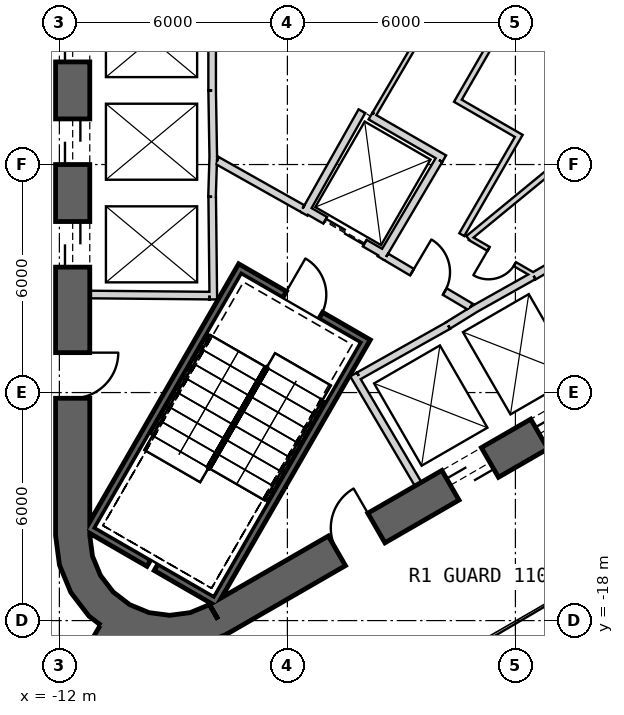
"""IFC4 building model, lengths in metres.
Left out: names, types, materials, properties, quantities, classifications, styles, units other than length and angle.
Written with IfcOpenShell. Run it as: python <this file> out.ifc"""

import sys

from ifc_helpers import new_model, si_unit, direction, frame, frame_2d, origin, place, context, subcontext, project, spatial, polyline, rectangle, outline, extrude, element, fill, save


model = new_model("IFC4")
c1 = context("Model", 3, precision=1e-05, world=origin(), true_north=direction((0.0, 1.0)))
c2 = subcontext(c1, "Body", "Model", "MODEL_VIEW")
j1 = project(units=[si_unit("LENGTHUNIT", "METRE"), si_unit("PLANEANGLEUNIT", "RADIAN")], contexts=[c1])
p1 = place(None, origin())
s1 = spatial("IfcSite", under=j1, at=p1, CompositionType="ELEMENT")
p2 = place(p1, origin())
s2 = spatial("IfcBuilding", under=s1, at=p2, CompositionType="ELEMENT")
p3 = place(p2, frame((0.0, 0.0, 33.5)))
s3 = spatial("IfcBuildingStorey", under=s2, at=p3, CompositionType="ELEMENT", Elevation=33.5)
p4 = place(p3, frame((-11.65, 15.762, 0.0), z_axis=(0.0, 0.0, 1.0), x_axis=(0.0, -1.0, 0.0)))
e1 = element("IfcWall", 1, at=p4, inside=s3, PredefinedType="SHEAR", context=c2, shape_type="SweptSolid", body=[
    extrude(rectangle(XDim=31.523, YDim=0.9, at=frame_2d((15.762, 0.0))), origin(), (0.0, 0.0, 1.0), 6.0),
])
p5 = place(p4, frame((7.062, 0.0, 0.0)))
e2 = element("IfcOpeningElement", 2, at=p5, cuts=e1, PredefinedType="OPENING", context=c2, shape_type="SweptSolid", body=[
    extrude(rectangle(XDim=1.2, YDim=2.4, at=frame_2d((0.6, 1.2))), frame((0.0, 0.46, 0.0), z_axis=(0.0, -1.0, 0.0), x_axis=(1.0, 0.0, 0.0)), (0.0, 0.0, 1.0), 0.92),
])
p6 = place(p4, frame((9.762, 0.0, 0.0)))
e3 = element("IfcOpeningElement", 3, at=p6, cuts=e1, PredefinedType="OPENING", context=c2, shape_type="SweptSolid", body=[
    extrude(rectangle(XDim=1.2, YDim=2.4, at=frame_2d((0.6, 1.2))), frame((0.0, 0.46, 0.0), z_axis=(0.0, -1.0, 0.0), x_axis=(1.0, 0.0, 0.0)), (0.0, 0.0, 1.0), 0.92),
])
p7 = place(p4, frame((12.462, 0.0, 0.0)))
e4 = element("IfcOpeningElement", 4, at=p7, cuts=e1, PredefinedType="OPENING", context=c2, shape_type="SweptSolid", body=[
    extrude(rectangle(XDim=1.2, YDim=2.4, at=frame_2d((0.6, 1.2))), frame((0.0, 0.46, 0.0), z_axis=(0.0, -1.0, 0.0), x_axis=(1.0, 0.0, 0.0)), (0.0, 0.0, 1.0), 0.92),
])
p8 = place(p4, frame((15.162, 0.0, 0.0)))
e5 = element("IfcOpeningElement", 5, at=p8, cuts=e1, PredefinedType="OPENING", context=c2, shape_type="SweptSolid", body=[
    extrude(rectangle(XDim=1.2, YDim=2.4, at=frame_2d((0.6, 1.2))), frame((0.0, 0.46, 0.0), z_axis=(0.0, -1.0, 0.0), x_axis=(1.0, 0.0, 0.0)), (0.0, 0.0, 1.0), 0.92),
])
p9 = place(p4, frame((17.862, 0.0, 0.0)))
e6 = element("IfcOpeningElement", 6, at=p9, cuts=e1, PredefinedType="OPENING", context=c2, shape_type="SweptSolid", body=[
    extrude(rectangle(XDim=1.2, YDim=2.4, at=frame_2d((0.6, 1.2))), frame((0.0, 0.46, 0.0), z_axis=(0.0, -1.0, 0.0), x_axis=(1.0, 0.0, 0.0)), (0.0, 0.0, 1.0), 0.92),
])
p10 = place(p4, frame((20.562, 0.0, 0.0)))
e7 = element("IfcOpeningElement", 7, at=p10, cuts=e1, PredefinedType="OPENING", context=c2, shape_type="SweptSolid", body=[
    extrude(rectangle(XDim=1.2, YDim=2.4, at=frame_2d((0.6, 1.2))), frame((0.0, 0.46, 0.0), z_axis=(0.0, -1.0, 0.0), x_axis=(1.0, 0.0, 0.0)), (0.0, 0.0, 1.0), 0.92),
])
p11 = place(p4, frame((23.262, 0.0, 0.0)))
e8 = element("IfcOpeningElement", 8, at=p11, cuts=e1, PredefinedType="OPENING", context=c2, shape_type="SweptSolid", body=[
    extrude(rectangle(XDim=1.2, YDim=2.4, at=frame_2d((0.6, 1.2))), frame((0.0, 0.46, 0.0), z_axis=(0.0, -1.0, 0.0), x_axis=(1.0, 0.0, 0.0)), (0.0, 0.0, 1.0), 0.92),
])
p12 = place(p4, frame((3.612, 0.0, 0.0)))
e9 = element("IfcOpeningElement", 9, at=p12, cuts=e1, PredefinedType="OPENING", context=c2, shape_type="SweptSolid", body=[
    extrude(rectangle(XDim=1.2, YDim=2.4, at=frame_2d((0.6, 1.2))), frame((0.0, 0.46, 0.0), z_axis=(0.0, -1.0, 0.0), x_axis=(1.0, 0.0, 0.0)), (0.0, 0.0, 1.0), 0.92),
])
p13 = place(p4, frame((26.712, 0.0, 0.0)))
e10 = element("IfcOpeningElement", 10, at=p13, cuts=e1, PredefinedType="OPENING", context=c2, shape_type="SweptSolid", body=[
    extrude(rectangle(XDim=1.2, YDim=2.4, at=frame_2d((0.6, 1.2))), frame((0.0, 0.46, 0.0), z_axis=(0.0, -1.0, 0.0), x_axis=(1.0, 0.0, 0.0)), (0.0, 0.0, 1.0), 0.92),
])
p14 = place(p3, frame((-7.825, -17.97, 0.0), z_axis=(0.0, 0.0, 1.0), x_axis=(0.866028369851, 0.499994862586, 0.0)))
e11 = element("IfcWall", 11, at=p14, inside=s3, PredefinedType="SHEAR", context=c2, shape_type="SweptSolid", body=[
    extrude(rectangle(XDim=31.523, YDim=0.9, at=frame_2d((15.762, 0.0))), origin(), (0.0, 0.0, 1.0), 6.0),
])
p15 = place(p14, frame((7.062, 0.0, 0.0)))
e12 = element("IfcOpeningElement", 12, at=p15, cuts=e11, PredefinedType="OPENING", context=c2, shape_type="SweptSolid", body=[
    extrude(rectangle(XDim=1.2, YDim=2.4, at=frame_2d((0.6, 1.2))), frame((0.0, 0.46, 0.0), z_axis=(0.0, -1.0, 0.0), x_axis=(1.0, 0.0, 0.0)), (0.0, 0.0, 1.0), 0.92),
])
p16 = place(p14, frame((9.762, 0.0, 0.0)))
e13 = element("IfcOpeningElement", 13, at=p16, cuts=e11, PredefinedType="OPENING", context=c2, shape_type="SweptSolid", body=[
    extrude(rectangle(XDim=1.2, YDim=2.4, at=frame_2d((0.6, 1.2))), frame((0.0, 0.46, 0.0), z_axis=(0.0, -1.0, 0.0), x_axis=(1.0, 0.0, 0.0)), (0.0, 0.0, 1.0), 0.92),
])
p17 = place(p14, frame((12.462, 0.0, 0.0)))
e14 = element("IfcOpeningElement", 14, at=p17, cuts=e11, PredefinedType="OPENING", context=c2, shape_type="SweptSolid", body=[
    extrude(rectangle(XDim=1.2, YDim=2.4, at=frame_2d((0.6, 1.2))), frame((0.0, 0.46, 0.0), z_axis=(0.0, -1.0, 0.0), x_axis=(1.0, 0.0, 0.0)), (0.0, 0.0, 1.0), 0.92),
])
p18 = place(p14, frame((15.162, 0.0, 0.0)))
e15 = element("IfcOpeningElement", 15, at=p18, cuts=e11, PredefinedType="OPENING", context=c2, shape_type="SweptSolid", body=[
    extrude(rectangle(XDim=1.2, YDim=2.4, at=frame_2d((0.6, 1.2))), frame((0.0, 0.46, 0.0), z_axis=(0.0, -1.0, 0.0), x_axis=(1.0, 0.0, 0.0)), (0.0, 0.0, 1.0), 0.92),
])
p19 = place(p14, frame((17.862, 0.0, 0.0)))
e16 = element("IfcOpeningElement", 16, at=p19, cuts=e11, PredefinedType="OPENING", context=c2, shape_type="SweptSolid", body=[
    extrude(rectangle(XDim=1.2, YDim=2.4, at=frame_2d((0.6, 1.2))), frame((0.0, 0.46, 0.0), z_axis=(0.0, -1.0, 0.0), x_axis=(1.0, 0.0, 0.0)), (0.0, 0.0, 1.0), 0.92),
])
p20 = place(p14, frame((20.562, 0.0, 0.0)))
e17 = element("IfcOpeningElement", 17, at=p20, cuts=e11, PredefinedType="OPENING", context=c2, shape_type="SweptSolid", body=[
    extrude(rectangle(XDim=1.2, YDim=2.4, at=frame_2d((0.6, 1.2))), frame((0.0, 0.46, 0.0), z_axis=(0.0, -1.0, 0.0), x_axis=(1.0, 0.0, 0.0)), (0.0, 0.0, 1.0), 0.92),
])
p21 = place(p14, frame((26.712, 0.0, 0.0)))
e18 = element("IfcOpeningElement", 18, at=p21, cuts=e11, PredefinedType="OPENING", context=c2, shape_type="SweptSolid", body=[
    extrude(rectangle(XDim=1.2, YDim=2.4, at=frame_2d((0.6, 1.2))), frame((0.0, 0.46, 0.0), z_axis=(0.0, -1.0, 0.0), x_axis=(1.0, 0.0, 0.0)), (0.0, 0.0, 1.0), 0.92),
])
p22 = place(p14, frame((3.612, 0.0, 0.0)))
e19 = element("IfcOpeningElement", 19, at=p22, cuts=e11, PredefinedType="OPENING", context=c2, shape_type="SweptSolid", body=[
    extrude(rectangle(XDim=1.2, YDim=2.4, at=frame_2d((0.6, 1.2))), frame((0.0, 0.46, 0.0), z_axis=(0.0, -1.0, 0.0), x_axis=(1.0, 0.0, 0.0)), (0.0, 0.0, 1.0), 0.92),
])
p23 = place(p3, origin())
e20 = element("IfcWall", 20, at=p23, inside=s3, PredefinedType="SHEAR", context=c2, shape_type="SweptSolid", body=[
    extrude(outline(polyline([(-12.1, -15.762), (-11.998, -16.538), (-11.698, -17.262), (-11.221, -17.883), (-10.6, -18.36), (-9.876, -18.659), (-9.1, -18.762), (-8.323, -18.659), (-7.6, -18.36), (-8.05, -17.58), (-8.556, -17.79), (-9.1, -17.862), (-9.644, -17.79), (-10.15, -17.58), (-10.585, -17.247), (-10.919, -16.812), (-11.128, -16.305), (-11.2, -15.762), (-12.1, -15.762)])), origin(), (0.0, 0.0, 1.0), 6.0),
])
p24 = place(p3, frame((-10.575, -18.316, 0.0), z_axis=(0.0, 0.0, 1.0), x_axis=(-0.499996575515, -0.866027380903, 0.0)))
e21 = element("IfcWall", 21, at=p24, inside=s3, PredefinedType="SHEAR", context=c2, shape_type="SweptSolid", body=[
    extrude(rectangle(XDim=13.954, YDim=0.8, at=frame_2d((6.977, 0.0))), origin(), (0.0, 0.0, 1.0), 6.0),
])
p25 = place(p24, frame((2.05, 0.0, 0.0)))
e22 = element("IfcOpeningElement", 22, at=p25, cuts=e21, PredefinedType="OPENING", context=c2, shape_type="SweptSolid", body=[
    extrude(rectangle(XDim=1.4, YDim=2.4, at=frame_2d((0.7, 1.2))), frame((0.0, 0.41, 0.0), z_axis=(0.0, -1.0, 0.0), x_axis=(1.0, 0.0, 0.0)), (0.0, 0.0, 1.0), 0.82),
])
p26 = place(p3, frame((-7.98, 4.05, 0.0), z_axis=(0.0, 0.0, 1.0), x_axis=(0.0, -1.0, 0.0)))
e23 = element("IfcWall", 23, at=p26, inside=s3, PredefinedType="PLUMBINGWALL", context=c2, shape_type="SweptSolid", body=[
    extrude(rectangle(XDim=8.1, YDim=0.2, at=frame_2d((4.05, 0.0))), origin(), (0.0, 0.0, 1.0), 5.65),
])
p27 = place(p3, frame((-7.95, -5.772, 0.0), z_axis=(0.0, 0.0, 1.0), x_axis=(-0.030803413295, -0.999525462272, 0.0)))
e24 = element("IfcWall", 24, at=p27, inside=s3, PredefinedType="PLUMBINGWALL", context=c2, shape_type="SweptSolid", body=[
    extrude(rectangle(XDim=1.078, YDim=0.2, at=frame_2d((0.539, 0.0))), origin(), (0.0, 0.0, 1.0), 5.65),
])
p28 = place(p3, frame((-7.98, -4.05, 0.0), z_axis=(0.0, 0.0, 1.0), x_axis=(0.016809909365, -0.999858703491, 0.0)))
e25 = element("IfcWall", 25, at=p28, inside=s3, PredefinedType="PLUMBINGWALL", context=c2, shape_type="SweptSolid", body=[
    extrude(rectangle(XDim=1.844, YDim=0.2, at=frame_2d((0.922, 0.0))), origin(), (0.0, 0.0, 1.0), 5.65),
])
p29 = place(p3, frame((-7.979, -6.85, 0.0), z_axis=(0.0, 0.0, 1.0), x_axis=(0.011121475088, -0.999938154483, 0.0)))
e26 = element("IfcWall", 26, at=p29, inside=s3, PredefinedType="PLUMBINGWALL", context=c2, shape_type="SweptSolid", body=[
    extrude(rectangle(XDim=2.7, YDim=0.2, at=frame_2d((1.35, 0.0))), origin(), (0.0, 0.0, 1.0), 5.65),
])
p30 = place(p3, frame((-8.05, -9.449, 0.0), z_axis=(0.0, 0.0, 1.0), x_axis=(-0.999957467379, 0.009222983926, 0.0)))
e27 = element("IfcWall", 27, at=p30, inside=s3, PredefinedType="PLUMBINGWALL", context=c2, shape_type="SweptSolid", body=[
    extrude(rectangle(XDim=3.15, YDim=0.2, at=frame_2d((1.575, 0.0))), origin(), (0.0, 0.0, 1.0), 5.65),
])
p31 = place(p3, frame((0.483, -8.936, 0.0), z_axis=(0.0, 0.0, 1.0), x_axis=(0.866030989016, 0.499990325971, 0.0)))
e28 = element("IfcWall", 28, at=p31, inside=s3, PredefinedType="PLUMBINGWALL", context=c2, shape_type="SweptSolid", body=[
    extrude(rectangle(XDim=8.1, YDim=0.2, at=frame_2d((4.05, 0.0))), origin(), (0.0, 0.0, 1.0), 5.65),
])
p32 = place(p3, frame((-2.558, -14.409, 0.0), z_axis=(0.0, 0.0, 1.0), x_axis=(-0.507997497166, 0.861358544901, 0.0)))
e29 = element("IfcWall", 29, at=p32, inside=s3, PredefinedType="PLUMBINGWALL", context=c2, shape_type="SweptSolid", body=[
    extrude(rectangle(XDim=3.35, YDim=0.2, at=frame_2d((1.675, 0.0))), origin(), (0.0, 0.0, 1.0), 5.65),
])
p33 = place(p3, frame((-1.769, -10.237, 0.0), z_axis=(0.0, 0.0, 1.0), x_axis=(-0.871534483978, -0.490334215854, 0.0)))
e30 = element("IfcWall", 30, at=p33, inside=s3, PredefinedType="PLUMBINGWALL", context=c2, shape_type="SweptSolid", body=[
    extrude(rectangle(XDim=2.7, YDim=0.2, at=frame_2d((1.35, 0.0))), origin(), (0.0, 0.0, 1.0), 5.65),
])
p34 = place(p3, frame((-1.024, -9.771, 0.0), z_axis=(0.0, 0.0, 1.0), x_axis=(-0.850348075135, -0.526220629693, 0.0)))
e31 = element("IfcWall", 31, at=p34, inside=s3, PredefinedType="PLUMBINGWALL", context=c2, shape_type="SweptSolid", body=[
    extrude(rectangle(XDim=0.878, YDim=0.2, at=frame_2d((0.439, 0.0))), origin(), (0.0, 0.0, 1.0), 5.65),
])
p35 = place(p3, frame((-1.13, -9.832, 0.0), z_axis=(0.0, 0.0, 1.0), x_axis=(0.871988740738, 0.489525929882, 0.0)))
e32 = element("IfcWall", 32, at=p35, inside=s3, PredefinedType="PLUMBINGWALL", context=c2, shape_type="SweptSolid", body=[
    extrude(rectangle(XDim=1.845, YDim=0.2, at=frame_2d((0.922, 0.0))), origin(), (0.0, 0.0, 1.0), 5.65),
])
p36 = place(p3, frame((-3.905, -10.563, -0.3), z_axis=(0.0, 0.0, 1.0), x_axis=(-0.500012932018, -0.866017937352, 0.0)))
e33 = element("IfcWall", 33, at=p36, inside=s3, PredefinedType="SHEAR", context=c2, shape_type="SweptSolid", body=[
    extrude(rectangle(XDim=8.1, YDim=0.2, at=frame_2d((4.05, 0.0))), origin(), (0.0, 0.0, 1.0), 5.95),
])
p37 = place(p3, frame((-11.282, -15.541, -0.3), z_axis=(0.0, 0.0, 1.0), x_axis=(0.866000578957, -0.500042995397, 0.0)))
e34 = element("IfcWall", 34, at=p37, inside=s3, PredefinedType="SHEAR", context=c2, shape_type="SweptSolid", body=[
    extrude(rectangle(XDim=1.89, YDim=0.2, at=frame_2d((0.945, 0.0))), origin(), (0.0, 0.0, 1.0), 5.95),
])
p38 = place(p3, frame((-9.455, -16.596, -0.3), z_axis=(0.0, 0.0, 1.0), x_axis=(0.866038843867, -0.499976720371, 0.0)))
e35 = element("IfcWall", 35, at=p38, inside=s3, PredefinedType="SHEAR", context=c2, shape_type="SweptSolid", body=[
    extrude(rectangle(XDim=1.69, YDim=0.2, at=frame_2d((0.845, 0.0))), origin(), (0.0, 0.0, 1.0), 5.95),
])
p39 = place(p3, frame((-7.196, -8.663, -0.3), z_axis=(0.0, 0.0, 1.0), x_axis=(-0.499997992926, -0.866026562566, 0.0)))
e36 = element("IfcWall", 36, at=p39, inside=s3, PredefinedType="SHEAR", context=c2, shape_type="SweptSolid", body=[
    extrude(rectangle(XDim=7.9, YDim=0.2, at=frame_2d((3.95, 0.0))), origin(), (0.0, 0.0, 1.0), 5.95),
])
p40 = place(p3, frame((-4.041, -10.599, -0.3), z_axis=(0.0, 0.0, 1.0), x_axis=(-0.866047807691, 0.499961193289, 0.0)))
e37 = element("IfcWall", 37, at=p40, inside=s3, PredefinedType="SHEAR", context=c2, shape_type="SweptSolid", body=[
    extrude(rectangle(XDim=3.6, YDim=0.2, at=frame_2d((1.8, 0.0))), origin(), (0.0, 0.0, 1.0), 5.95),
])
p41 = place(p40, frame((1.25, 0.0, 0.3)))
e38 = element("IfcOpeningElement", 38, at=p41, cuts=e37, PredefinedType="OPENING", context=c2, shape_type="SweptSolid", body=[
    extrude(rectangle(XDim=1.1, YDim=2.1, at=frame_2d((0.55, 1.05))), frame((0.0, 0.11, 0.0), z_axis=(0.0, -1.0, 0.0), x_axis=(1.0, 0.0, 0.0)), (0.0, 0.0, 1.0), 0.22),
])
p42 = place(p3, frame((-3.446, -8.368, 0.0), z_axis=(0.0, 0.0, 1.0), x_axis=(-0.866024647952, 0.500001309137, 0.0)))
e39 = element("IfcWall", 39, at=p42, inside=s3, PredefinedType="PLUMBINGWALL", context=c2, shape_type="SweptSolid", body=[
    extrude(rectangle(XDim=2.4, YDim=0.2, at=frame_2d((1.2, 0.0))), origin(), (0.0, 0.0, 1.0), 5.65),
])
p43 = place(p42, frame((0.6, 0.0, 0.0)))
e40 = element("IfcOpeningElement", 40, at=p43, cuts=e39, PredefinedType="OPENING", context=c2, shape_type="SweptSolid", body=[
    extrude(rectangle(XDim=1.2, YDim=2.4, at=frame_2d((0.6, 1.2))), frame((0.0, 0.11, 0.0), z_axis=(0.0, -1.0, 0.0), x_axis=(1.0, 0.0, 0.0)), (0.0, 0.0, 1.0), 0.22),
])
p44 = place(p3, frame((-5.562, -7.296, 0.0), z_axis=(0.0, 0.0, 1.0), x_axis=(0.491322718731, 0.870977603649, 0.0)))
e41 = element("IfcWall", 41, at=p44, inside=s3, PredefinedType="PLUMBINGWALL", context=c2, shape_type="SweptSolid", body=[
    extrude(rectangle(XDim=3.1, YDim=0.2, at=frame_2d((1.55, 0.0))), origin(), (0.0, 0.0, 1.0), 5.65),
])
p45 = place(p3, frame((-3.814, -4.726, 0.0), z_axis=(0.0, 0.0, 1.0), x_axis=(0.866000409959, -0.500043288077, 0.0)))
e42 = element("IfcWall", 42, at=p45, inside=s3, PredefinedType="PLUMBINGWALL", context=c2, shape_type="SweptSolid", body=[
    extrude(rectangle(XDim=2.24, YDim=0.2, at=frame_2d((1.12, 0.0))), origin(), (0.0, 0.0, 1.0), 5.65),
])
p46 = place(p3, frame((-2.012, -5.882, 0.0), z_axis=(0.0, 0.0, 1.0), x_axis=(-0.508619639323, -0.860991325447, 0.0)))
e43 = element("IfcWall", 43, at=p46, inside=s3, PredefinedType="PLUMBINGWALL", context=c2, shape_type="SweptSolid", body=[
    extrude(rectangle(XDim=3.0, YDim=0.2, at=frame_2d((1.5, 0.0))), origin(), (0.0, 0.0, 1.0), 5.65),
])
p47 = place(p3, frame((-7.849, -5.894, 0.0), z_axis=(0.0, 0.0, 1.0), x_axis=(0.871340486379, -0.490678873396, 0.0)))
e44 = element("IfcWall", 44, at=p47, inside=s3, PredefinedType="PARTITIONING", context=c2, shape_type="SweptSolid", body=[
    extrude(rectangle(XDim=2.581, YDim=0.2, at=frame_2d((1.291, 0.0))), origin(), (0.0, 0.0, 1.0), 5.65),
])
p48 = place(p3, frame((-3.401, -8.43, 0.0), z_axis=(0.0, 0.0, 1.0), x_axis=(0.860598681535, -0.509283721849, 0.0)))
e45 = element("IfcWall", 45, at=p48, inside=s3, PredefinedType="PARTITIONING", context=c2, shape_type="SweptSolid", body=[
    extrude(rectangle(XDim=2.581, YDim=0.2, at=frame_2d((1.291, 0.0))), origin(), (0.0, 0.0, 1.0), 5.65),
])
p49 = place(p48, frame((0.791, 0.0, 0.0)))
e46 = element("IfcOpeningElement", 46, at=p49, cuts=e45, PredefinedType="OPENING", context=c2, shape_type="SweptSolid", body=[
    extrude(rectangle(XDim=1.0, YDim=2.1, at=frame_2d((0.5, 1.05))), frame((0.0, 0.11, 0.0), z_axis=(0.0, -1.0, 0.0), x_axis=(1.0, 0.0, 0.0)), (0.0, 0.0, 1.0), 0.22),
])
p50 = place(p3, frame((-3.711, -4.67, 0.0), z_axis=(0.0, 0.0, 1.0), x_axis=(0.505649867547, 0.862738785178, 0.0)))
e47 = element("IfcWall", 47, at=p50, inside=s3, PredefinedType="PARTITIONING", context=c2, shape_type="SweptSolid", body=[
    extrude(rectangle(XDim=4.409, YDim=0.12, at=frame_2d((2.205, 0.0))), origin(), (0.0, 0.0, 1.0), 5.65),
])
p51 = place(p3, frame((6.834, -1.302, 0.0), z_axis=(0.0, 0.0, 1.0), x_axis=(-0.772564687607, -0.634936062499, 0.0)))
e48 = element("IfcWall", 48, at=p51, inside=s3, PredefinedType="PLUMBINGWALL", context=c2, shape_type="SweptSolid", body=[
    extrude(rectangle(XDim=10.457, YDim=0.15, at=frame_2d((5.229, 0.0))), origin(), (0.0, 0.0, 1.0), 5.65),
])
p52 = place(p3, frame((0.126, -5.182, 0.0), z_axis=(0.0, 0.0, 1.0), x_axis=(-0.499956128963, -0.866050731258, 0.0)))
e49 = element("IfcWall", 49, at=p52, inside=s3, PredefinedType="PLUMBINGWALL", context=c2, shape_type="SweptSolid", body=[
    extrude(rectangle(XDim=3.075, YDim=0.15, at=frame_2d((1.538, 0.0))), origin(), (0.0, 0.0, 1.0), 5.65),
])
p53 = place(p3, frame((-1.579, -4.285, 0.0), z_axis=(0.0, 0.0, 1.0), x_axis=(0.866033964044, -0.499985172903, 0.0)))
e50 = element("IfcWall", 50, at=p53, inside=s3, PredefinedType="PLUMBINGWALL", context=c2, shape_type="SweptSolid", body=[
    extrude(rectangle(XDim=1.85, YDim=0.15, at=frame_2d((0.925, 0.0))), origin(), (0.0, 0.0, 1.0), 5.65),
])
p54 = place(p3, frame((0.065, -1.587, 0.0), z_axis=(0.0, 0.0, 1.0), x_axis=(-0.499980683721, -0.866036555756, 0.0)))
e51 = element("IfcWall", 51, at=p54, inside=s3, PredefinedType="PLUMBINGWALL", context=c2, shape_type="SweptSolid", body=[
    extrude(rectangle(XDim=3.083, YDim=0.15, at=frame_2d((1.541, 0.0))), origin(), (0.0, 0.0, 1.0), 5.65),
])
p55 = place(p3, frame((-1.195, -7.936, 0.0), z_axis=(0.0, 0.0, 1.0), x_axis=(0.864964234746, -0.501833510848, 0.0)))
e52 = element("IfcWall", 52, at=p55, inside=s3, PredefinedType="PARTITIONING", context=c2, shape_type="SweptSolid", body=[
    extrude(rectangle(XDim=1.931, YDim=0.12, at=frame_2d((0.965, 0.0))), origin(), (0.0, 0.0, 1.0), 5.65),
])
p56 = place(p55, frame((0.565, 0.0, 0.0)))
e53 = element("IfcOpeningElement", 53, at=p56, cuts=e52, PredefinedType="OPENING", context=c2, shape_type="SweptSolid", body=[
    extrude(rectangle(XDim=0.8, YDim=2.1, at=frame_2d((0.4, 1.05))), frame((0.0, 0.07, 0.0), z_axis=(0.0, -1.0, 0.0), x_axis=(1.0, 0.0, 0.0)), (0.0, 0.0, 1.0), 0.14),
])
p57 = place(p41, origin())
e54 = element("IfcDoor", 54, at=p57, inside=s3, OperationType="SINGLE_SWING_RIGHT", PredefinedType="USERDEFINED", context=c2, shape_type="SweptSolid", body=[
    extrude(rectangle(XDim=1.1, YDim=2.1, at=frame_2d((0.55, 1.05))), frame((0.0, 0.025, 0.0), z_axis=(0.0, -1.0, 0.0), x_axis=(1.0, 0.0, 0.0)), (0.0, 0.0, 1.0), 0.05),
])
fill(e38, e54)
p58 = place(p49, origin())
e55 = element("IfcDoor", 55, at=p58, inside=s3, OperationType="SINGLE_SWING_LEFT", PredefinedType="USERDEFINED", context=c2, shape_type="SweptSolid", body=[
    extrude(rectangle(XDim=1.0, YDim=2.1, at=frame_2d((0.5, 1.05))), frame((0.0, 0.025, 0.0), z_axis=(0.0, -1.0, 0.0), x_axis=(1.0, 0.0, 0.0)), (0.0, 0.0, 1.0), 0.05),
])
fill(e46, e55)
p59 = place(p43, origin())
e56 = element("IfcDoor", 56, at=p59, inside=s3, OperationType="SLIDING_TO_LEFT", PredefinedType="USERDEFINED", context=c2, shape_type="SweptSolid", body=[
    extrude(rectangle(XDim=1.2, YDim=2.4, at=frame_2d((0.6, 1.2))), frame((0.0, 0.025, 0.0), z_axis=(0.0, -1.0, 0.0), x_axis=(1.0, 0.0, 0.0)), (0.0, 0.0, 1.0), 0.05),
])
fill(e40, e56)
p60 = place(p56, origin())
e57 = element("IfcDoor", 57, at=p60, inside=s3, OperationType="SINGLE_SWING_LEFT", PredefinedType="USERDEFINED", context=c2, shape_type="SweptSolid", body=[
    extrude(rectangle(XDim=0.8, YDim=2.1, at=frame_2d((0.4, 1.05))), frame((0.0, 0.025, 0.0), z_axis=(0.0, -1.0, 0.0), x_axis=(1.0, 0.0, 0.0)), (0.0, 0.0, 1.0), 0.05),
])
fill(e53, e57)
p61 = place(p9, origin())
e58 = element("IfcDoor", 58, at=p61, inside=s3, OperationType="SLIDING_TO_LEFT", PredefinedType="USERDEFINED", context=c2, shape_type="SweptSolid", body=[
    extrude(rectangle(XDim=1.2, YDim=2.4, at=frame_2d((0.6, 1.2))), frame((0.0, 0.025, 0.0), z_axis=(0.0, -1.0, 0.0), x_axis=(1.0, 0.0, 0.0)), (0.0, 0.0, 1.0), 0.05),
])
fill(e6, e58)
p62 = place(p10, origin())
e59 = element("IfcDoor", 59, at=p62, inside=s3, OperationType="SLIDING_TO_LEFT", PredefinedType="USERDEFINED", context=c2, shape_type="SweptSolid", body=[
    extrude(rectangle(XDim=1.2, YDim=2.4, at=frame_2d((0.6, 1.2))), frame((0.0, 0.025, 0.0), z_axis=(0.0, -1.0, 0.0), x_axis=(1.0, 0.0, 0.0)), (0.0, 0.0, 1.0), 0.05),
])
fill(e7, e59)
p63 = place(p11, origin())
e60 = element("IfcDoor", 60, at=p63, inside=s3, OperationType="SLIDING_TO_LEFT", PredefinedType="USERDEFINED", context=c2, shape_type="SweptSolid", body=[
    extrude(rectangle(XDim=1.2, YDim=2.4, at=frame_2d((0.6, 1.2))), frame((0.0, 0.025, 0.0), z_axis=(0.0, -1.0, 0.0), x_axis=(1.0, 0.0, 0.0)), (0.0, 0.0, 1.0), 0.05),
])
fill(e8, e60)
p64 = place(p15, origin())
e61 = element("IfcDoor", 61, at=p64, inside=s3, OperationType="SLIDING_TO_LEFT", PredefinedType="USERDEFINED", context=c2, shape_type="SweptSolid", body=[
    extrude(rectangle(XDim=1.2, YDim=2.4, at=frame_2d((0.6, 1.2))), frame((0.0, 0.025, 0.0), z_axis=(0.0, -1.0, 0.0), x_axis=(1.0, 0.0, 0.0)), (0.0, 0.0, 1.0), 0.05),
])
fill(e12, e61)
p65 = place(p16, origin())
e62 = element("IfcDoor", 62, at=p65, inside=s3, OperationType="SLIDING_TO_LEFT", PredefinedType="USERDEFINED", context=c2, shape_type="SweptSolid", body=[
    extrude(rectangle(XDim=1.2, YDim=2.4, at=frame_2d((0.6, 1.2))), frame((0.0, 0.025, 0.0), z_axis=(0.0, -1.0, 0.0), x_axis=(1.0, 0.0, 0.0)), (0.0, 0.0, 1.0), 0.05),
])
fill(e13, e62)
p66 = place(p13, origin())
e63 = element("IfcDoor", 63, at=p66, inside=s3, OperationType="SINGLE_SWING_LEFT", PredefinedType="USERDEFINED", context=c2, shape_type="SweptSolid", body=[
    extrude(rectangle(XDim=1.2, YDim=2.4, at=frame_2d((0.6, 1.2))), frame((0.0, 0.025, 0.0), z_axis=(0.0, -1.0, 0.0), x_axis=(1.0, 0.0, 0.0)), (0.0, 0.0, 1.0), 0.05),
])
fill(e10, e63)
p67 = place(p22, origin())
e64 = element("IfcDoor", 64, at=p67, inside=s3, OperationType="SINGLE_SWING_RIGHT", PredefinedType="USERDEFINED", context=c2, shape_type="SweptSolid", body=[
    extrude(rectangle(XDim=1.2, YDim=2.4, at=frame_2d((0.6, 1.2))), frame((0.0, 0.025, 0.0), z_axis=(0.0, -1.0, 0.0), x_axis=(1.0, 0.0, 0.0)), (0.0, 0.0, 1.0), 0.05),
])
fill(e19, e64)
save(model, sys.argv[1])
